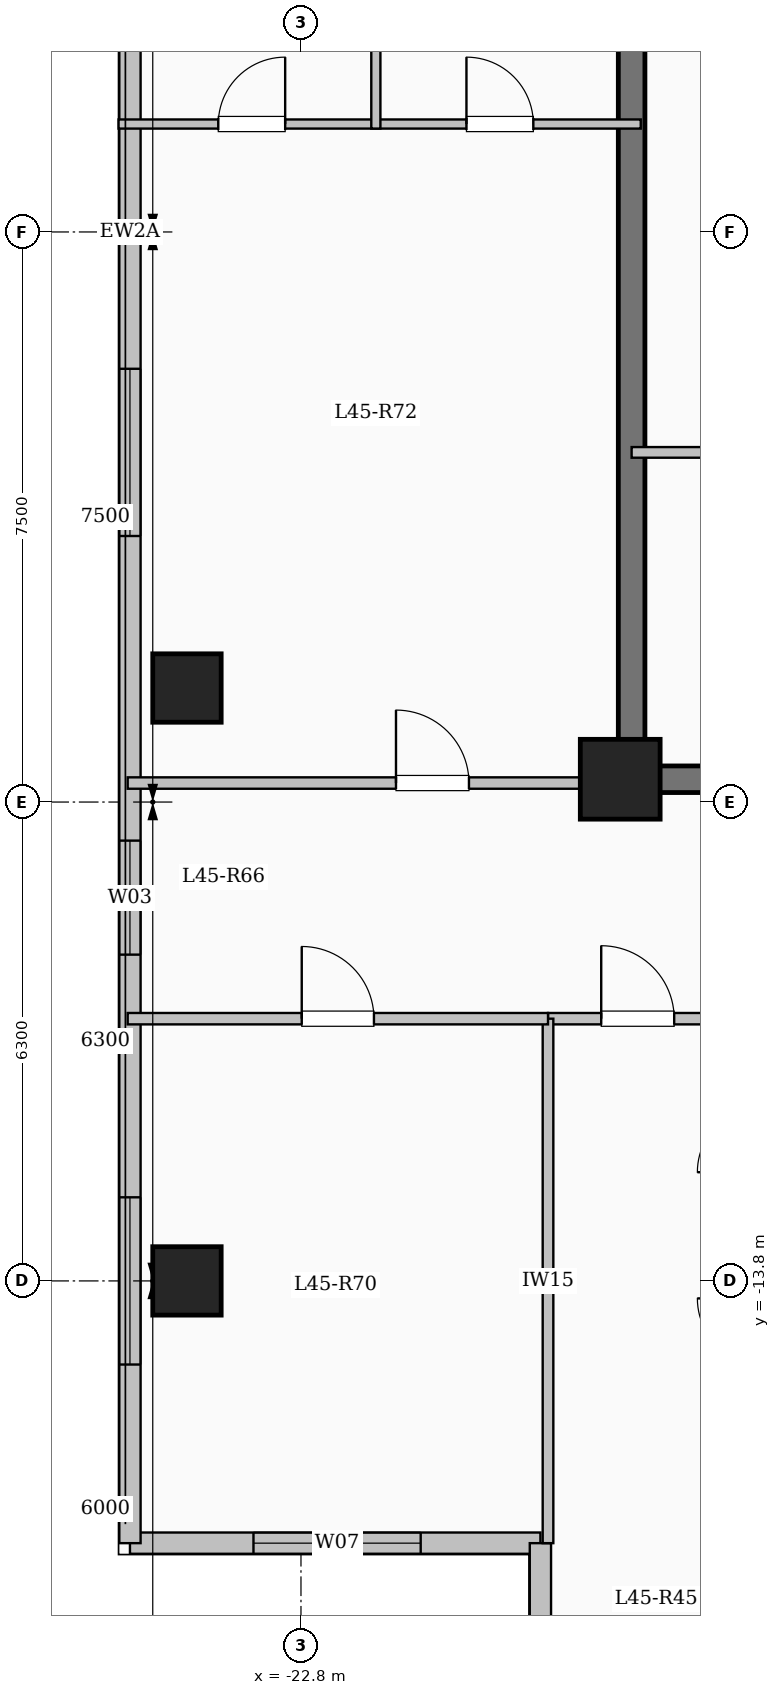
"""IFC4 building model, lengths in metres.
Left out: names, types, materials, properties, quantities, classifications, styles, units other than length and angle.
Written with IfcOpenShell. Run it as: python <this file> out.ifc"""

import sys

from ifc_helpers import new_model, si_unit, direction, frame, frame_2d, origin, origin_2d, place, context, subcontext, project, spatial, rectangle, extrude, element, fill, save


model = new_model("IFC4")
c1 = context("Model", 3, precision=1e-05, world=origin(), true_north=direction((0.0, 1.0)))
c2 = subcontext(c1, "Body", "Model", "MODEL_VIEW")
j1 = project(units=[si_unit("LENGTHUNIT", "METRE"), si_unit("PLANEANGLEUNIT", "RADIAN")], contexts=[c1])
p1 = place(None, origin())
s1 = spatial("IfcSite", under=j1, at=p1, CompositionType="ELEMENT")
p2 = place(p1, origin())
s2 = spatial("IfcBuilding", under=s1, at=p2, CompositionType="ELEMENT")
p3 = place(p2, frame((0.0, 0.0, 166.1)))
s3 = spatial("IfcBuildingStorey", under=s2, at=p3, CompositionType="ELEMENT", Elevation=166.1)
p4 = place(p3, frame((-18.6, -7.2, 0.0), z_axis=(0.0, 0.0, 1.0), x_axis=(1.0, 0.0, 0.0)))
e1 = element("IfcColumn", 1, at=p4, inside=s3, PredefinedType="COLUMN", context=c2, shape_type="SweptSolid", body=[
    extrude(rectangle(XDim=1.05, YDim=1.05, at=origin_2d()), origin(), (0.0, 0.0, 1.0), 3.35),
])
for number, where, z_axis, x_axis in (
    (2, (-24.3, -13.8, 0.0), (0.0, 0.0, 1.0), (1.0, 0.0, 0.0)),
    (3, (-24.3, -6.0, 0.0), (0.0, 0.0, 1.0), (1.0, 0.0, 0.0)),
):
    element("IfcColumn", number, at=place(p3, frame(where, z_axis=z_axis, x_axis=x_axis)), inside=s3, PredefinedType="COLUMN", context=c2, shape_type="SweptSolid", body=[
        extrude(rectangle(XDim=0.9, YDim=0.9, at=origin_2d()), origin(), (0.0, 0.0, 1.0), 3.35),
    ])
p5 = place(p3, frame((-19.65, -17.25, 0.0), z_axis=(0.0, 0.0, 1.0), x_axis=(-1.0, 0.0, 0.0)))
e4 = element("IfcWall", 4, at=p5, inside=s3, PredefinedType="SOLIDWALL", context=c2, shape_type="SweptSolid", body=[
    extrude(rectangle(XDim=5.4, YDim=0.28, at=frame_2d((2.7, 0.0))), origin(), (0.0, 0.0, 1.0), 3.1),
])
p6 = place(p5, frame((1.575, 0.0, 0.9)))
e5 = element("IfcOpeningElement", 5, at=p6, cuts=e4, PredefinedType="OPENING", context=c2, shape_type="SweptSolid", body=[
    extrude(rectangle(XDim=2.2, YDim=1.75, at=frame_2d((1.1, 0.875))), frame((0.0, 0.15, 0.0), z_axis=(0.0, -1.0, 0.0), x_axis=(1.0, 0.0, 0.0)), (0.0, 0.0, 1.0), 0.3),
])
p7 = place(p3, frame((-25.05, -17.25, 0.0), z_axis=(0.0, 0.0, 1.0), x_axis=(0.0, 1.0, 0.0)))
e6 = element("IfcWall", 6, at=p7, inside=s3, PredefinedType="SOLIDWALL", context=c2, shape_type="SweptSolid", body=[
    extrude(rectangle(XDim=34.5, YDim=0.28, at=frame_2d((17.25, 0.0))), origin(), (0.0, 0.0, 1.0), 3.1),
])
p8 = place(p7, frame((2.35, 0.0, 0.9)))
e7 = element("IfcOpeningElement", 7, at=p8, cuts=e6, PredefinedType="OPENING", context=c2, shape_type="SweptSolid", body=[
    extrude(rectangle(XDim=2.2, YDim=1.75, at=frame_2d((1.1, 0.875))), frame((0.0, 0.15, 0.0), z_axis=(0.0, -1.0, 0.0), x_axis=(1.0, 0.0, 0.0)), (0.0, 0.0, 1.0), 0.3),
])
p9 = place(p7, frame((7.742, 0.0, 0.9)))
e8 = element("IfcOpeningElement", 8, at=p9, cuts=e6, PredefinedType="OPENING", context=c2, shape_type="SweptSolid", body=[
    extrude(rectangle(XDim=1.5, YDim=1.65, at=frame_2d((0.75, 0.825))), frame((0.0, 0.15, 0.0), z_axis=(0.0, -1.0, 0.0), x_axis=(1.0, 0.0, 0.0)), (0.0, 0.0, 1.0), 0.3),
])
p10 = place(p7, frame((13.25, 0.0, 0.9)))
e9 = element("IfcOpeningElement", 9, at=p10, cuts=e6, PredefinedType="OPENING", context=c2, shape_type="SweptSolid", body=[
    extrude(rectangle(XDim=2.2, YDim=1.75, at=frame_2d((1.1, 0.875))), frame((0.0, 0.15, 0.0), z_axis=(0.0, -1.0, 0.0), x_axis=(1.0, 0.0, 0.0)), (0.0, 0.0, 1.0), 0.3),
])
p11 = place(p7, frame((19.65, 0.0, 0.9)))
e10 = element("IfcOpeningElement", 10, at=p11, cuts=e6, PredefinedType="OPENING", context=c2, shape_type="SweptSolid", body=[
    extrude(rectangle(XDim=1.65, YDim=1.6, at=frame_2d((0.825, 0.8))), frame((0.0, 0.15, 0.0), z_axis=(0.0, -1.0, 0.0), x_axis=(1.0, 0.0, 0.0)), (0.0, 0.0, 1.0), 0.3),
])
p12 = place(p7, frame((24.125, 0.0, 0.9)))
e11 = element("IfcOpeningElement", 11, at=p12, cuts=e6, PredefinedType="OPENING", context=c2, shape_type="SweptSolid", body=[
    extrude(rectangle(XDim=2.0, YDim=1.7, at=frame_2d((1.0, 0.85))), frame((0.0, 0.15, 0.0), z_axis=(0.0, -1.0, 0.0), x_axis=(1.0, 0.0, 0.0)), (0.0, 0.0, 1.0), 0.3),
])
p13 = place(p7, frame((28.375, 0.0, 0.95)))
e12 = element("IfcOpeningElement", 12, at=p13, cuts=e6, PredefinedType="OPENING", context=c2, shape_type="SweptSolid", body=[
    extrude(rectangle(XDim=1.0, YDim=1.5, at=frame_2d((0.5, 0.75))), frame((0.0, 0.15, 0.0), z_axis=(0.0, -1.0, 0.0), x_axis=(1.0, 0.0, 0.0)), (0.0, 0.0, 1.0), 0.3),
])
p14 = place(p7, frame((31.125, 0.0, 0.9)))
e13 = element("IfcOpeningElement", 13, at=p14, cuts=e6, PredefinedType="OPENING", context=c2, shape_type="SweptSolid", body=[
    extrude(rectangle(XDim=2.0, YDim=1.7, at=frame_2d((1.0, 0.85))), frame((0.0, 0.15, 0.0), z_axis=(0.0, -1.0, 0.0), x_axis=(1.0, 0.0, 0.0)), (0.0, 0.0, 1.0), 0.3),
])
p15 = place(p3, frame((-19.65, -21.15, 0.0), z_axis=(0.0, 0.0, 1.0), x_axis=(0.0, 1.0, 0.0)))
e14 = element("IfcWall", 14, at=p15, inside=s3, PredefinedType="SOLIDWALL", context=c2, shape_type="SweptSolid", body=[
    extrude(rectangle(XDim=3.9, YDim=0.28, at=frame_2d((1.95, 0.0))), origin(), (0.0, 0.0, 1.0), 3.1),
])
p16 = place(p15, frame((1.143, 0.0, 0.9)))
e15 = element("IfcOpeningElement", 15, at=p16, cuts=e14, PredefinedType="OPENING", context=c2, shape_type="SweptSolid", body=[
    extrude(rectangle(XDim=1.65, YDim=1.6, at=frame_2d((0.825, 0.8))), frame((0.0, 0.15, 0.0), z_axis=(0.0, -1.0, 0.0), x_axis=(1.0, 0.0, 0.0)), (0.0, 0.0, 1.0), 0.3),
])
p17 = place(p3, frame((-18.45, -7.375, 0.0), z_axis=(0.0, 0.0, 1.0), x_axis=(0.0, 1.0, 0.0)))
e16 = element("IfcWall", 16, at=p17, inside=s3, PredefinedType="SHEAR", context=c2, shape_type="SweptSolid", body=[
    extrude(rectangle(XDim=14.05, YDim=0.35, at=frame_2d((7.025, 0.0))), origin(), (0.0, 0.0, 1.0), 3.35),
])
p18 = place(p3, frame((-18.625, -7.2, 0.0), z_axis=(0.0, 0.0, 1.0), x_axis=(1.0, 0.0, 0.0)))
e17 = element("IfcWall", 17, at=p18, inside=s3, PredefinedType="SHEAR", context=c2, shape_type="SweptSolid", body=[
    extrude(rectangle(XDim=8.55, YDim=0.35, at=frame_2d((4.275, 0.0))), origin(), (0.0, 0.0, 1.0), 3.35),
])
p19 = place(p3, frame((-18.45, -2.9, 0.0), z_axis=(0.0, 0.0, 1.0), x_axis=(1.0, 0.0, 0.0)))
e18 = element("IfcWall", 18, at=p19, inside=s3, PredefinedType="PARTITIONING", context=c2, shape_type="SweptSolid", body=[
    extrude(rectangle(XDim=3.05, YDim=0.14, at=frame_2d((1.525, 0.0))), origin(), (0.0, 0.0, 1.0), 3.1),
])
p20 = place(p19, frame((1.05, 0.0, 0.0)))
e19 = element("IfcOpeningElement", 19, at=p20, cuts=e18, PredefinedType="OPENING", context=c2, shape_type="SweptSolid", body=[
    extrude(rectangle(XDim=0.9, YDim=2.08, at=frame_2d((0.45, 1.04))), frame((0.0, 0.08, 0.0), z_axis=(0.0, -1.0, 0.0), x_axis=(1.0, 0.0, 0.0)), (0.0, 0.0, 1.0), 0.16),
])
p21 = place(p3, frame((-19.55, -10.35, 0.0), z_axis=(0.0, 0.0, 1.0), x_axis=(1.0, 0.0, 0.0)))
e20 = element("IfcWall", 20, at=p21, inside=s3, PredefinedType="PARTITIONING", context=c2, shape_type="SweptSolid", body=[
    extrude(rectangle(XDim=11.0, YDim=0.15, at=frame_2d((5.5, 0.0))), origin(), (0.0, 0.0, 1.0), 3.1),
])
p22 = place(p21, frame((0.7, 0.0, 0.0)))
e21 = element("IfcOpeningElement", 21, at=p22, cuts=e20, PredefinedType="OPENING", context=c2, shape_type="SweptSolid", body=[
    extrude(rectangle(XDim=0.96, YDim=2.15, at=frame_2d((0.48, 1.075))), frame((0.0, 0.085, 0.0), z_axis=(0.0, -1.0, 0.0), x_axis=(1.0, 0.0, 0.0)), (0.0, 0.0, 1.0), 0.17),
])
p23 = place(p21, frame((6.175, 0.0, 0.0)))
e22 = element("IfcOpeningElement", 22, at=p23, cuts=e20, PredefinedType="OPENING", context=c2, shape_type="SweptSolid", body=[
    extrude(rectangle(XDim=0.96, YDim=2.15, at=frame_2d((0.48, 1.075))), frame((0.0, 0.085, 0.0), z_axis=(0.0, -1.0, 0.0), x_axis=(1.0, 0.0, 0.0)), (0.0, 0.0, 1.0), 0.17),
])
p24 = place(p3, frame((-25.08, -7.25, 0.0), z_axis=(0.0, 0.0, 1.0), x_axis=(1.0, 0.0, 0.0)))
e23 = element("IfcWall", 23, at=p24, inside=s3, PredefinedType="PARTITIONING", context=c2, shape_type="SweptSolid", body=[
    extrude(rectangle(XDim=6.63, YDim=0.15, at=frame_2d((3.315, 0.0))), origin(), (0.0, 0.0, 1.0), 3.1),
])
p25 = place(p24, frame((3.53, 0.0, 0.0)))
e24 = element("IfcOpeningElement", 24, at=p25, cuts=e23, PredefinedType="OPENING", context=c2, shape_type="SweptSolid", body=[
    extrude(rectangle(XDim=0.96, YDim=2.15, at=frame_2d((0.48, 1.075))), frame((0.0, 0.085, 0.0), z_axis=(0.0, -1.0, 0.0), x_axis=(1.0, 0.0, 0.0)), (0.0, 0.0, 1.0), 0.17),
])
p26 = place(p3, frame((-19.55, -17.25, 0.0), z_axis=(0.0, 0.0, 1.0), x_axis=(0.0, 1.0, 0.0)))
e25 = element("IfcWall", 25, at=p26, inside=s3, PredefinedType="PARTITIONING", context=c2, shape_type="SweptSolid", body=[
    extrude(rectangle(XDim=6.9, YDim=0.14, at=frame_2d((3.45, 0.0))), origin(), (0.0, 0.0, 1.0), 3.1),
])
p27 = place(p3, frame((-25.08, -10.35, 0.0), z_axis=(0.0, 0.0, 1.0), x_axis=(1.0, 0.0, 0.0)))
e26 = element("IfcWall", 26, at=p27, inside=s3, PredefinedType="PARTITIONING", context=c2, shape_type="SweptSolid", body=[
    extrude(rectangle(XDim=5.53, YDim=0.15, at=frame_2d((2.765, 0.0))), origin(), (0.0, 0.0, 1.0), 3.1),
])
p28 = place(p27, frame((2.29, 0.0, 0.0)))
e27 = element("IfcOpeningElement", 27, at=p28, cuts=e26, PredefinedType="OPENING", context=c2, shape_type="SweptSolid", body=[
    extrude(rectangle(XDim=0.95, YDim=2.15, at=frame_2d((0.475, 1.075))), frame((0.0, 0.085, 0.0), z_axis=(0.0, -1.0, 0.0), x_axis=(1.0, 0.0, 0.0)), (0.0, 0.0, 1.0), 0.17),
])
p29 = place(p3, frame((-25.2, 1.42, 0.0), z_axis=(0.0, 0.0, 1.0), x_axis=(1.0, 0.0, 0.0)))
e28 = element("IfcWall", 28, at=p29, inside=s3, PredefinedType="PARTITIONING", context=c2, shape_type="SweptSolid", body=[
    extrude(rectangle(XDim=6.87, YDim=0.12, at=frame_2d((3.435, 0.0))), origin(), (0.0, 0.0, 1.0), 3.1),
])
p30 = place(p29, frame((1.312, 0.0, 0.0)))
e29 = element("IfcOpeningElement", 29, at=p30, cuts=e28, PredefinedType="OPENING", context=c2, shape_type="SweptSolid", body=[
    extrude(rectangle(XDim=0.88, YDim=2.1, at=frame_2d((0.44, 1.05))), frame((0.0, 0.07, 0.0), z_axis=(0.0, -1.0, 0.0), x_axis=(1.0, 0.0, 0.0)), (0.0, 0.0, 1.0), 0.14),
])
p31 = place(p29, frame((4.577, 0.0, 0.0)))
e30 = element("IfcOpeningElement", 30, at=p31, cuts=e28, PredefinedType="OPENING", context=c2, shape_type="SweptSolid", body=[
    extrude(rectangle(XDim=0.88, YDim=2.1, at=frame_2d((0.44, 1.05))), frame((0.0, 0.07, 0.0), z_axis=(0.0, -1.0, 0.0), x_axis=(1.0, 0.0, 0.0)), (0.0, 0.0, 1.0), 0.14),
])
p32 = place(p3, frame((-21.815, 1.36, 0.0), z_axis=(0.0, 0.0, 1.0), x_axis=(0.0, 1.0, 0.0)))
e31 = element("IfcWall", 31, at=p32, inside=s3, PredefinedType="PARTITIONING", context=c2, shape_type="SweptSolid", body=[
    extrude(rectangle(XDim=3.58, YDim=0.12, at=frame_2d((1.79, 0.0))), origin(), (0.0, 0.0, 1.0), 3.1),
])
p33 = place(p6, origin())
e32 = element("IfcWindow", 32, at=p33, inside=s3, PartitioningType="SINGLE_PANEL", PredefinedType="WINDOW", context=c2, shape_type="SweptSolid", body=[
    extrude(rectangle(XDim=2.2, YDim=1.75, at=frame_2d((1.1, 0.875))), frame((0.0, 0.03, 0.0), z_axis=(0.0, -1.0, 0.0), x_axis=(1.0, 0.0, 0.0)), (0.0, 0.0, 1.0), 0.06),
])
fill(e5, e32)
p34 = place(p8, origin())
e33 = element("IfcWindow", 33, at=p34, inside=s3, PartitioningType="SINGLE_PANEL", PredefinedType="WINDOW", context=c2, shape_type="SweptSolid", body=[
    extrude(rectangle(XDim=2.2, YDim=1.75, at=frame_2d((1.1, 0.875))), frame((0.0, 0.03, 0.0), z_axis=(0.0, -1.0, 0.0), x_axis=(1.0, 0.0, 0.0)), (0.0, 0.0, 1.0), 0.06),
])
fill(e7, e33)
p35 = place(p9, origin())
e34 = element("IfcWindow", 34, at=p35, inside=s3, PartitioningType="SINGLE_PANEL", PredefinedType="WINDOW", context=c2, shape_type="SweptSolid", body=[
    extrude(rectangle(XDim=1.5, YDim=1.65, at=frame_2d((0.75, 0.825))), frame((0.0, 0.03, 0.0), z_axis=(0.0, -1.0, 0.0), x_axis=(1.0, 0.0, 0.0)), (0.0, 0.0, 1.0), 0.06),
])
fill(e8, e34)
p36 = place(p10, origin())
e35 = element("IfcWindow", 35, at=p36, inside=s3, PartitioningType="SINGLE_PANEL", PredefinedType="WINDOW", context=c2, shape_type="SweptSolid", body=[
    extrude(rectangle(XDim=2.2, YDim=1.75, at=frame_2d((1.1, 0.875))), frame((0.0, 0.03, 0.0), z_axis=(0.0, -1.0, 0.0), x_axis=(1.0, 0.0, 0.0)), (0.0, 0.0, 1.0), 0.06),
])
fill(e9, e35)
p37 = place(p22, origin())
e36 = element("IfcDoor", 36, at=p37, inside=s3, OperationType="SINGLE_SWING_LEFT", PredefinedType="DOOR", context=c2, shape_type="SweptSolid", body=[
    extrude(rectangle(XDim=0.96, YDim=2.15, at=frame_2d((0.48, 1.075))), frame((0.0, 0.025, 0.0), z_axis=(0.0, -1.0, 0.0), x_axis=(1.0, 0.0, 0.0)), (0.0, 0.0, 1.0), 0.05),
])
fill(e21, e36)
p38 = place(p28, origin())
e37 = element("IfcDoor", 37, at=p38, inside=s3, OperationType="SINGLE_SWING_LEFT", PredefinedType="DOOR", context=c2, shape_type="SweptSolid", body=[
    extrude(rectangle(XDim=0.95, YDim=2.15, at=frame_2d((0.475, 1.075))), frame((0.0, 0.025, 0.0), z_axis=(0.0, -1.0, 0.0), x_axis=(1.0, 0.0, 0.0)), (0.0, 0.0, 1.0), 0.05),
])
fill(e27, e37)
p39 = place(p25, origin())
e38 = element("IfcDoor", 38, at=p39, inside=s3, OperationType="SINGLE_SWING_LEFT", PredefinedType="DOOR", context=c2, shape_type="SweptSolid", body=[
    extrude(rectangle(XDim=0.96, YDim=2.15, at=frame_2d((0.48, 1.075))), frame((0.0, 0.025, 0.0), z_axis=(0.0, -1.0, 0.0), x_axis=(1.0, 0.0, 0.0)), (0.0, 0.0, 1.0), 0.05),
])
fill(e24, e38)
p40 = place(p30, origin())
e39 = element("IfcDoor", 39, at=p40, inside=s3, OperationType="SINGLE_SWING_RIGHT", PredefinedType="DOOR", context=c2, shape_type="SweptSolid", body=[
    extrude(rectangle(XDim=0.88, YDim=2.1, at=frame_2d((0.44, 1.05))), frame((0.0, 0.025, 0.0), z_axis=(0.0, -1.0, 0.0), x_axis=(1.0, 0.0, 0.0)), (0.0, 0.0, 1.0), 0.05),
])
fill(e29, e39)
p41 = place(p31, origin())
e40 = element("IfcDoor", 40, at=p41, inside=s3, OperationType="SINGLE_SWING_LEFT", PredefinedType="DOOR", context=c2, shape_type="SweptSolid", body=[
    extrude(rectangle(XDim=0.88, YDim=2.1, at=frame_2d((0.44, 1.05))), frame((0.0, 0.025, 0.0), z_axis=(0.0, -1.0, 0.0), x_axis=(1.0, 0.0, 0.0)), (0.0, 0.0, 1.0), 0.05),
])
fill(e30, e40)
save(model, sys.argv[1])
